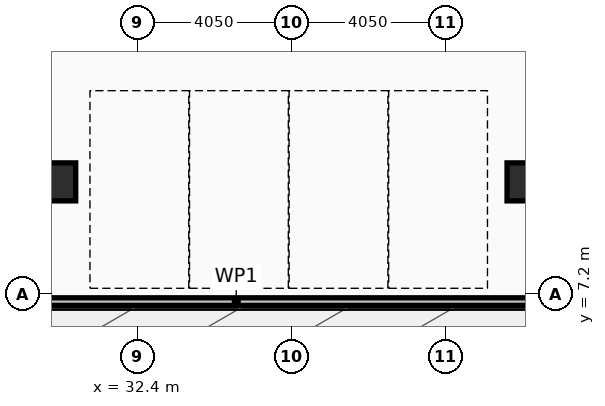
"""IFC4 building model, lengths in metres.
Left out: names, types, materials, properties, quantities, classifications, styles, units other than length and angle.
Written with IfcOpenShell. Run it as: python <this file> out.ifc"""

import sys

from ifc_helpers import new_model, si_unit, direction, frame, frame_2d, origin, origin_2d, place, context, subcontext, project, spatial, rectangle, hollow_rectangle, extrude, element, save


model = new_model("IFC4")
c1 = context("Model", 3, precision=1e-05, world=origin(), true_north=direction((0.0, 1.0)))
c2 = subcontext(c1, "Body", "Model", "MODEL_VIEW")
j1 = project(units=[si_unit("LENGTHUNIT", "METRE"), si_unit("PLANEANGLEUNIT", "RADIAN")], contexts=[c1])
p1 = place(None, origin())
s1 = spatial("IfcSite", under=j1, at=p1, CompositionType="ELEMENT")
p2 = place(p1, origin())
s2 = spatial("IfcBuilding", under=s1, at=p2, CompositionType="ELEMENT")
p3 = place(p2, frame((0.0, 0.0, -4.5)))
s3 = spatial("IfcBuildingStorey", under=s2, at=p3, CompositionType="ELEMENT", Elevation=-4.5)
for number, where, z_axis, x_axis in (
    (1, (30.375, 10.15, 0.0), (0.0, 0.0, 1.0), (1.0, 0.0, 0.0)),
    (2, (42.525, 10.15, 0.0), (0.0, 0.0, 1.0), (1.0, 0.0, 0.0)),
):
    element("IfcColumn", number, at=place(p3, frame(where, z_axis=z_axis, x_axis=x_axis)), inside=s3, PredefinedType="COLUMN", context=c2, shape_type="SweptSolid", body=[
        extrude(hollow_rectangle(XDim=0.8, YDim=1.0, WallThickness=0.055, at=origin_2d()), origin(), (0.0, 0.0, 1.0), 4.5),
    ])
p4 = place(p3, frame((12.5, 7.0, 0.0), z_axis=(0.0, 0.0, 1.0), x_axis=(1.0, 0.0, 0.0)))
e3 = element("IfcWall", 3, at=p4, inside=s3, PredefinedType="PARTITIONING", context=c2, shape_type="SweptSolid", body=[
    extrude(rectangle(XDim=45.0, YDim=0.2, at=frame_2d((22.5, 0.0))), origin(), (0.0, 0.0, 1.0), 3.37),
])
save(model, sys.argv[1])
